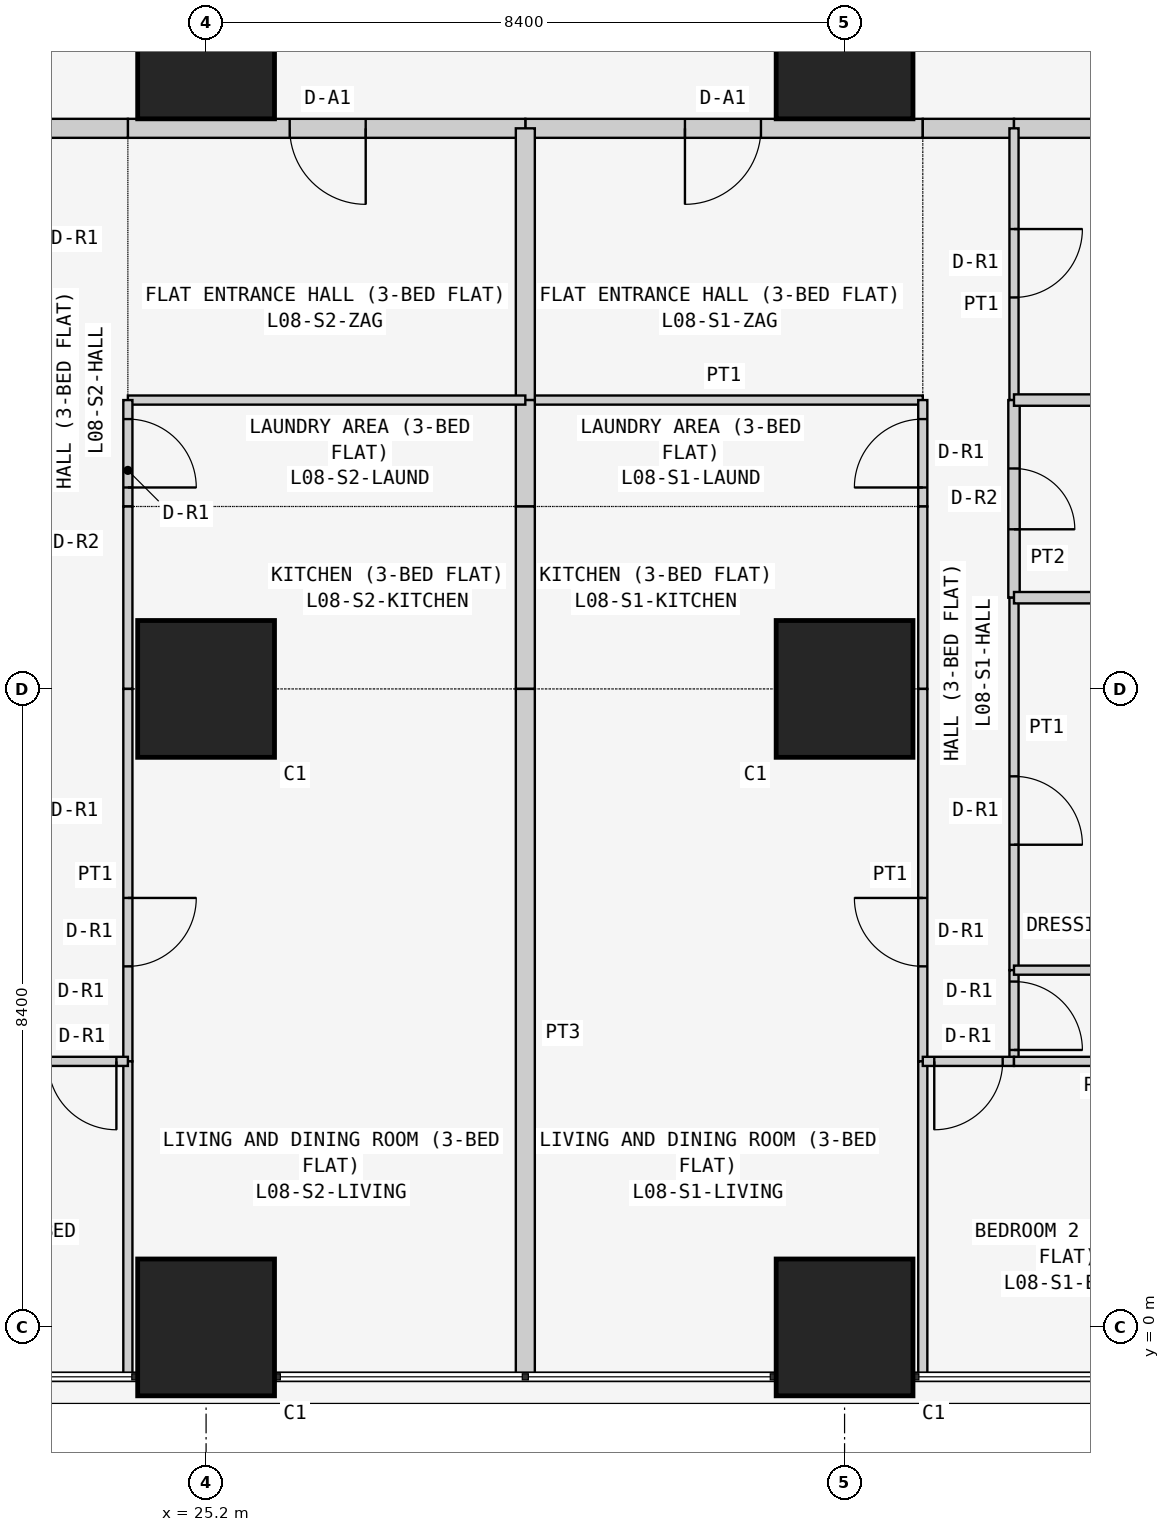
"""IFC4 building model, lengths in metres.
Left out: names, types, materials, properties, quantities, classifications, styles, units other than length and angle.
Written with IfcOpenShell. Run it as: python <this file> out.ifc"""

import sys

from ifc_helpers import new_model, si_unit, direction, frame, frame_2d, origin, origin_2d, place, context, subcontext, project, spatial, rectangle, extrude, element, fill, save


model = new_model("IFC4")
c1 = context("Model", 3, precision=1e-05, world=origin(), true_north=direction((0.0, 1.0)))
c2 = subcontext(c1, "Body", "Model", "MODEL_VIEW")
j1 = project(units=[si_unit("LENGTHUNIT", "METRE"), si_unit("PLANEANGLEUNIT", "RADIAN")], contexts=[c1])
p1 = place(None, origin())
s1 = spatial("IfcSite", under=j1, at=p1, CompositionType="ELEMENT")
p2 = place(p1, origin())
s2 = spatial("IfcBuilding", under=s1, at=p2, CompositionType="ELEMENT")
p3 = place(p2, frame((0.0, 0.0, 38.1)))
s3 = spatial("IfcBuildingStorey", under=s2, at=p3, CompositionType="ELEMENT", Elevation=38.1)
for number, where, z_axis, x_axis in (
    (1, (25.2, 0.0, 0.0), (0.0, 0.0, 1.0), (1.0, 0.0, 0.0)),
    (2, (25.2, 8.4, 0.0), (0.0, 0.0, 1.0), (1.0, 0.0, 0.0)),
    (3, (25.2, 16.8, 0.0), (0.0, 0.0, 1.0), (1.0, 0.0, 0.0)),
    (4, (33.6, 0.0, 0.0), (0.0, 0.0, 1.0), (1.0, 0.0, 0.0)),
    (5, (33.6, 8.4, 0.0), (0.0, 0.0, 1.0), (1.0, 0.0, 0.0)),
    (6, (33.6, 16.8, 0.0), (0.0, 0.0, 1.0), (1.0, 0.0, 0.0)),
):
    element("IfcColumn", number, at=place(p3, frame(where, z_axis=z_axis, x_axis=x_axis)), inside=s3, PredefinedType="COLUMN", context=c2, shape_type="SweptSolid", body=[
        extrude(rectangle(XDim=1.8, YDim=1.8, at=origin_2d()), origin(), (0.0, 0.0, 1.0), 3.6),
    ])
p4 = place(p3, frame((34.629, 15.775, 0.0), z_axis=(0.0, 0.0, 1.0), x_axis=(-1.0, 0.0, 0.0)))
e7 = element("IfcWall", 7, at=p4, inside=s3, PredefinedType="PARTITIONING", context=c2, shape_type="SweptSolid", body=[
    extrude(rectangle(XDim=5.229, YDim=0.25, at=frame_2d((2.615, 0.0))), origin(), (0.0, 0.0, 1.0), 3.45),
])
p5 = place(p4, frame((2.129, 0.0, 0.0)))
e8 = element("IfcOpeningElement", 8, at=p5, cuts=e7, PredefinedType="OPENING", context=c2, shape_type="SweptSolid", body=[
    extrude(rectangle(XDim=1.0, YDim=2.1, at=frame_2d((0.5, 1.05))), frame((0.0, 0.135, 0.0), z_axis=(0.0, -1.0, 0.0), x_axis=(1.0, 0.0, 0.0)), (0.0, 0.0, 1.0), 0.27),
])
p6 = place(p3, frame((35.829, 15.775, 0.0), z_axis=(0.0, 0.0, 1.0), x_axis=(-1.0, 0.0, 0.0)))
e9 = element("IfcWall", 9, at=p6, inside=s3, PredefinedType="PARTITIONING", context=c2, shape_type="SweptSolid", body=[
    extrude(rectangle(XDim=1.2, YDim=0.25, at=frame_2d((0.6, 0.0))), origin(), (0.0, 0.0, 1.0), 3.45),
])
p7 = place(p3, frame((42.7, 15.775, 0.0), z_axis=(0.0, 0.0, 1.0), x_axis=(-1.0, 0.0, 0.0)))
e10 = element("IfcWall", 10, at=p7, inside=s3, PredefinedType="PARTITIONING", context=c2, shape_type="SweptSolid", body=[
    extrude(rectangle(XDim=6.871, YDim=0.25, at=frame_2d((3.436, 0.0))), origin(), (0.0, 0.0, 1.0), 3.45),
])
p8 = place(p3, frame((29.4, 15.775, 0.0), z_axis=(0.0, 0.0, 1.0), x_axis=(-1.0, 0.0, 0.0)))
e11 = element("IfcWall", 11, at=p8, inside=s3, PredefinedType="PARTITIONING", context=c2, shape_type="SweptSolid", body=[
    extrude(rectangle(XDim=5.229, YDim=0.25, at=frame_2d((2.615, 0.0))), origin(), (0.0, 0.0, 1.0), 3.45),
])
p9 = place(p8, frame((2.1, 0.0, 0.0)))
e12 = element("IfcOpeningElement", 12, at=p9, cuts=e11, PredefinedType="OPENING", context=c2, shape_type="SweptSolid", body=[
    extrude(rectangle(XDim=1.0, YDim=2.1, at=frame_2d((0.5, 1.05))), frame((0.0, 0.135, 0.0), z_axis=(0.0, -1.0, 0.0), x_axis=(1.0, 0.0, 0.0)), (0.0, 0.0, 1.0), 0.27),
])
p10 = place(p3, frame((24.171, 15.775, 0.0), z_axis=(0.0, 0.0, 1.0), x_axis=(-1.0, 0.0, 0.0)))
e13 = element("IfcWall", 13, at=p10, inside=s3, PredefinedType="PARTITIONING", context=c2, shape_type="SweptSolid", body=[
    extrude(rectangle(XDim=1.2, YDim=0.25, at=frame_2d((0.6, 0.0))), origin(), (0.0, 0.0, 1.0), 3.45),
])
p11 = place(p3, frame((29.4, 12.2, 0.0), z_axis=(0.0, 0.0, 1.0), x_axis=(1.0, 0.0, 0.0)))
e14 = element("IfcWall", 14, at=p11, inside=s3, PredefinedType="PARTITIONING", context=c2, shape_type="SweptSolid", body=[
    extrude(rectangle(XDim=5.229, YDim=0.12, at=frame_2d((2.615, 0.0))), origin(), (0.0, 0.0, 1.0), 3.45),
])
p12 = place(p3, frame((29.4, 15.775, 0.0), z_axis=(0.0, 0.0, 1.0), x_axis=(0.0, -1.0, 0.0)))
e15 = element("IfcWall", 15, at=p12, inside=s3, PredefinedType="PARTITIONING", context=c2, shape_type="SweptSolid", body=[
    extrude(rectangle(XDim=3.575, YDim=0.25, at=frame_2d((1.788, 0.0))), origin(), (0.0, 0.0, 1.0), 2.848),
])
p13 = place(p3, frame((34.629, 10.8, 0.0), z_axis=(0.0, 0.0, 1.0), x_axis=(0.0, 1.0, 0.0)))
e16 = element("IfcWall", 16, at=p13, inside=s3, PredefinedType="PARTITIONING", context=c2, shape_type="SweptSolid", body=[
    extrude(rectangle(XDim=1.4, YDim=0.12, at=frame_2d((0.7, 0.0))), origin(), (0.0, 0.0, 1.0), 3.45),
])
p14 = place(p13, frame((0.25, 0.0, 0.0)))
e17 = element("IfcOpeningElement", 17, at=p14, cuts=e16, PredefinedType="OPENING", context=c2, shape_type="SweptSolid", body=[
    extrude(rectangle(XDim=0.9, YDim=2.1, at=frame_2d((0.45, 1.05))), frame((0.0, 0.07, 0.0), z_axis=(0.0, -1.0, 0.0), x_axis=(1.0, 0.0, 0.0)), (0.0, 0.0, 1.0), 0.14),
])
p15 = place(p3, frame((29.4, 12.2, 0.0), z_axis=(0.0, 0.0, 1.0), x_axis=(0.0, -1.0, 0.0)))
e18 = element("IfcWall", 18, at=p15, inside=s3, PredefinedType="PARTITIONING", context=c2, shape_type="SweptSolid", body=[
    extrude(rectangle(XDim=1.4, YDim=0.25, at=frame_2d((0.7, 0.0))), origin(), (0.0, 0.0, 1.0), 2.848),
])
p16 = place(p3, frame((34.629, 8.4, 0.0), z_axis=(0.0, 0.0, 1.0), x_axis=(0.0, 1.0, 0.0)))
e19 = element("IfcWall", 19, at=p16, inside=s3, PredefinedType="PARTITIONING", context=c2, shape_type="SweptSolid", body=[
    extrude(rectangle(XDim=2.4, YDim=0.12, at=frame_2d((1.2, 0.0))), origin(), (0.0, 0.0, 1.0), 3.45),
])
p17 = place(p3, frame((29.4, 10.8, 0.0), z_axis=(0.0, 0.0, 1.0), x_axis=(0.0, -1.0, 0.0)))
e20 = element("IfcWall", 20, at=p17, inside=s3, PredefinedType="PARTITIONING", context=c2, shape_type="SweptSolid", body=[
    extrude(rectangle(XDim=2.4, YDim=0.25, at=frame_2d((1.2, 0.0))), origin(), (0.0, 0.0, 1.0), 2.848),
])
p18 = place(p3, frame((34.629, 3.5, 0.0), z_axis=(0.0, 0.0, 1.0), x_axis=(0.0, 1.0, 0.0)))
e21 = element("IfcWall", 21, at=p18, inside=s3, PredefinedType="PARTITIONING", context=c2, shape_type="SweptSolid", body=[
    extrude(rectangle(XDim=4.9, YDim=0.12, at=frame_2d((2.45, 0.0))), origin(), (0.0, 0.0, 1.0), 3.45),
])
p19 = place(p18, frame((1.25, 0.0, 0.0)))
e22 = element("IfcOpeningElement", 22, at=p19, cuts=e21, PredefinedType="OPENING", context=c2, shape_type="SweptSolid", body=[
    extrude(rectangle(XDim=0.9, YDim=2.1, at=frame_2d((0.45, 1.05))), frame((0.0, 0.07, 0.0), z_axis=(0.0, -1.0, 0.0), x_axis=(1.0, 0.0, 0.0)), (0.0, 0.0, 1.0), 0.14),
])
p20 = place(p3, frame((34.629, -0.65, 0.0), z_axis=(0.0, 0.0, 1.0), x_axis=(0.0, 1.0, 0.0)))
e23 = element("IfcWall", 23, at=p20, inside=s3, PredefinedType="PARTITIONING", context=c2, shape_type="SweptSolid", body=[
    extrude(rectangle(XDim=4.15, YDim=0.12, at=frame_2d((2.075, 0.0))), origin(), (0.0, 0.0, 1.0), 3.45),
])
p21 = place(p3, frame((29.4, 8.4, 0.0), z_axis=(0.0, 0.0, 1.0), x_axis=(0.0, -1.0, 0.0)))
e24 = element("IfcWall", 24, at=p21, inside=s3, PredefinedType="PARTITIONING", context=c2, shape_type="SweptSolid", body=[
    extrude(rectangle(XDim=9.05, YDim=0.25, at=frame_2d((4.525, 0.0))), origin(), (0.0, 0.0, 1.0), 2.848),
])
p22 = place(p3, frame((35.829, 12.2, 0.0), z_axis=(0.0, 0.0, 1.0), x_axis=(0.0, 1.0, 0.0)))
e25 = element("IfcWall", 25, at=p22, inside=s3, PredefinedType="PARTITIONING", context=c2, shape_type="SweptSolid", body=[
    extrude(rectangle(XDim=3.575, YDim=0.12, at=frame_2d((1.788, 0.0))), origin(), (0.0, 0.0, 1.0), 3.45),
])
p23 = place(p22, frame((1.35, 0.0, 0.0)))
e26 = element("IfcOpeningElement", 26, at=p23, cuts=e25, PredefinedType="OPENING", context=c2, shape_type="SweptSolid", body=[
    extrude(rectangle(XDim=0.9, YDim=2.1, at=frame_2d((0.45, 1.05))), frame((0.0, 0.07, 0.0), z_axis=(0.0, -1.0, 0.0), x_axis=(1.0, 0.0, 0.0)), (0.0, 0.0, 1.0), 0.14),
])
p24 = place(p3, frame((35.829, 9.6, 0.0), z_axis=(0.0, 0.0, 1.0), x_axis=(0.0, 1.0, 0.0)))
e27 = element("IfcWall", 27, at=p24, inside=s3, PredefinedType="PARTITIONING", context=c2, shape_type="SweptSolid", body=[
    extrude(rectangle(XDim=2.6, YDim=0.15, at=frame_2d((1.3, 0.0))), origin(), (0.0, 0.0, 1.0), 3.45),
])
p25 = place(p24, frame((0.9, 0.0, 0.0)))
e28 = element("IfcOpeningElement", 28, at=p25, cuts=e27, PredefinedType="OPENING", context=c2, shape_type="SweptSolid", body=[
    extrude(rectangle(XDim=0.8, YDim=2.1, at=frame_2d((0.4, 1.05))), frame((0.0, 0.085, 0.0), z_axis=(0.0, -1.0, 0.0), x_axis=(1.0, 0.0, 0.0)), (0.0, 0.0, 1.0), 0.17),
])
p26 = place(p3, frame((35.829, 4.7, 0.0), z_axis=(0.0, 0.0, 1.0), x_axis=(0.0, 1.0, 0.0)))
e29 = element("IfcWall", 29, at=p26, inside=s3, PredefinedType="PARTITIONING", context=c2, shape_type="SweptSolid", body=[
    extrude(rectangle(XDim=4.9, YDim=0.12, at=frame_2d((2.45, 0.0))), origin(), (0.0, 0.0, 1.0), 3.45),
])
p27 = place(p26, frame((1.65, 0.0, 0.0)))
e30 = element("IfcOpeningElement", 30, at=p27, cuts=e29, PredefinedType="OPENING", context=c2, shape_type="SweptSolid", body=[
    extrude(rectangle(XDim=0.9, YDim=2.1, at=frame_2d((0.45, 1.05))), frame((0.0, 0.07, 0.0), z_axis=(0.0, -1.0, 0.0), x_axis=(1.0, 0.0, 0.0)), (0.0, 0.0, 1.0), 0.14),
])
p28 = place(p3, frame((35.829, 3.5, 0.0), z_axis=(0.0, 0.0, 1.0), x_axis=(0.0, 1.0, 0.0)))
e31 = element("IfcWall", 31, at=p28, inside=s3, PredefinedType="PARTITIONING", context=c2, shape_type="SweptSolid", body=[
    extrude(rectangle(XDim=1.2, YDim=0.12, at=frame_2d((0.6, 0.0))), origin(), (0.0, 0.0, 1.0), 3.45),
])
p29 = place(p28, frame((0.15, 0.0, 0.0)))
e32 = element("IfcOpeningElement", 32, at=p29, cuts=e31, PredefinedType="OPENING", context=c2, shape_type="SweptSolid", body=[
    extrude(rectangle(XDim=0.9, YDim=2.1, at=frame_2d((0.45, 1.05))), frame((0.0, 0.07, 0.0), z_axis=(0.0, -1.0, 0.0), x_axis=(1.0, 0.0, 0.0)), (0.0, 0.0, 1.0), 0.14),
])
p30 = place(p3, frame((34.629, 3.5, 0.0), z_axis=(0.0, 0.0, 1.0), x_axis=(1.0, 0.0, 0.0)))
e33 = element("IfcWall", 33, at=p30, inside=s3, PredefinedType="PARTITIONING", context=c2, shape_type="SweptSolid", body=[
    extrude(rectangle(XDim=1.2, YDim=0.12, at=frame_2d((0.6, 0.0))), origin(), (0.0, 0.0, 1.0), 3.45),
])
p31 = place(p30, frame((0.151, 0.0, 0.0)))
e34 = element("IfcOpeningElement", 34, at=p31, cuts=e33, PredefinedType="OPENING", context=c2, shape_type="SweptSolid", body=[
    extrude(rectangle(XDim=0.9, YDim=2.1, at=frame_2d((0.45, 1.05))), frame((0.0, 0.07, 0.0), z_axis=(0.0, -1.0, 0.0), x_axis=(1.0, 0.0, 0.0)), (0.0, 0.0, 1.0), 0.14),
])
for number, where, z_axis, x_axis in (
    (35, (35.829, 12.2, 0.0), (0.0, 0.0, 1.0), (1.0, 0.0, 0.0)),
    (36, (35.829, 9.6, 0.0), (0.0, 0.0, 1.0), (1.0, 0.0, 0.0)),
):
    element("IfcWall", number, at=place(p3, frame(where, z_axis=z_axis, x_axis=x_axis)), inside=s3, PredefinedType="PARTITIONING", context=c2, shape_type="SweptSolid", body=[
        extrude(rectangle(XDim=2.971, YDim=0.15, at=frame_2d((1.485, 0.0))), origin(), (0.0, 0.0, 1.0), 3.45),
    ])
for number, where, z_axis, x_axis in (
    (37, (35.829, 4.7, 0.0), (0.0, 0.0, 1.0), (1.0, 0.0, 0.0)),
    (38, (35.829, 3.5, 0.0), (0.0, 0.0, 1.0), (1.0, 0.0, 0.0)),
):
    element("IfcWall", number, at=place(p3, frame(where, z_axis=z_axis, x_axis=x_axis)), inside=s3, PredefinedType="PARTITIONING", context=c2, shape_type="SweptSolid", body=[
        extrude(rectangle(XDim=2.285, YDim=0.12, at=frame_2d((1.143, 0.0))), origin(), (0.0, 0.0, 1.0), 3.45),
    ])
p32 = place(p3, frame((29.4, 12.2, 0.0), z_axis=(0.0, 0.0, 1.0), x_axis=(-1.0, 0.0, 0.0)))
e39 = element("IfcWall", 39, at=p32, inside=s3, PredefinedType="PARTITIONING", context=c2, shape_type="SweptSolid", body=[
    extrude(rectangle(XDim=5.229, YDim=0.12, at=frame_2d((2.615, 0.0))), origin(), (0.0, 0.0, 1.0), 3.45),
])
p33 = place(p3, frame((24.171, 10.8, 0.0), z_axis=(0.0, 0.0, 1.0), x_axis=(0.0, 1.0, 0.0)))
e40 = element("IfcWall", 40, at=p33, inside=s3, PredefinedType="PARTITIONING", context=c2, shape_type="SweptSolid", body=[
    extrude(rectangle(XDim=1.4, YDim=0.12, at=frame_2d((0.7, 0.0))), origin(), (0.0, 0.0, 1.0), 3.45),
])
p34 = place(p33, frame((0.25, 0.0, 0.0)))
e41 = element("IfcOpeningElement", 41, at=p34, cuts=e40, PredefinedType="OPENING", context=c2, shape_type="SweptSolid", body=[
    extrude(rectangle(XDim=0.9, YDim=2.1, at=frame_2d((0.45, 1.05))), frame((0.0, 0.07, 0.0), z_axis=(0.0, -1.0, 0.0), x_axis=(1.0, 0.0, 0.0)), (0.0, 0.0, 1.0), 0.14),
])
p35 = place(p3, frame((24.171, 8.4, 0.0), z_axis=(0.0, 0.0, 1.0), x_axis=(0.0, 1.0, 0.0)))
e42 = element("IfcWall", 42, at=p35, inside=s3, PredefinedType="PARTITIONING", context=c2, shape_type="SweptSolid", body=[
    extrude(rectangle(XDim=2.4, YDim=0.12, at=frame_2d((1.2, 0.0))), origin(), (0.0, 0.0, 1.0), 3.45),
])
p36 = place(p3, frame((24.171, 3.5, 0.0), z_axis=(0.0, 0.0, 1.0), x_axis=(0.0, 1.0, 0.0)))
e43 = element("IfcWall", 43, at=p36, inside=s3, PredefinedType="PARTITIONING", context=c2, shape_type="SweptSolid", body=[
    extrude(rectangle(XDim=4.9, YDim=0.12, at=frame_2d((2.45, 0.0))), origin(), (0.0, 0.0, 1.0), 3.45),
])
p37 = place(p36, frame((1.25, 0.0, 0.0)))
e44 = element("IfcOpeningElement", 44, at=p37, cuts=e43, PredefinedType="OPENING", context=c2, shape_type="SweptSolid", body=[
    extrude(rectangle(XDim=0.9, YDim=2.1, at=frame_2d((0.45, 1.05))), frame((0.0, 0.07, 0.0), z_axis=(0.0, -1.0, 0.0), x_axis=(1.0, 0.0, 0.0)), (0.0, 0.0, 1.0), 0.14),
])
p38 = place(p3, frame((24.171, -0.65, 0.0), z_axis=(0.0, 0.0, 1.0), x_axis=(0.0, 1.0, 0.0)))
e45 = element("IfcWall", 45, at=p38, inside=s3, PredefinedType="PARTITIONING", context=c2, shape_type="SweptSolid", body=[
    extrude(rectangle(XDim=4.15, YDim=0.12, at=frame_2d((2.075, 0.0))), origin(), (0.0, 0.0, 1.0), 3.45),
])
p39 = place(p3, frame((24.171, 3.5, 0.0), z_axis=(0.0, 0.0, 1.0), x_axis=(-1.0, 0.0, 0.0)))
e46 = element("IfcWall", 46, at=p39, inside=s3, PredefinedType="PARTITIONING", context=c2, shape_type="SweptSolid", body=[
    extrude(rectangle(XDim=1.2, YDim=0.12, at=frame_2d((0.6, 0.0))), origin(), (0.0, 0.0, 1.0), 3.45),
])
p40 = place(p39, frame((0.151, 0.0, 0.0)))
e47 = element("IfcOpeningElement", 47, at=p40, cuts=e46, PredefinedType="OPENING", context=c2, shape_type="SweptSolid", body=[
    extrude(rectangle(XDim=0.9, YDim=2.1, at=frame_2d((0.45, 1.05))), frame((0.0, 0.07, 0.0), z_axis=(0.0, -1.0, 0.0), x_axis=(1.0, 0.0, 0.0)), (0.0, 0.0, 1.0), 0.14),
])
p41 = place(p5, origin())
e48 = element("IfcDoor", 48, at=p41, inside=s3, OperationType="SINGLE_SWING_RIGHT", PredefinedType="DOOR", context=c2, shape_type="SweptSolid", body=[
    extrude(rectangle(XDim=1.0, YDim=2.1, at=frame_2d((0.5, 1.05))), frame((0.0, 0.025, 0.0), z_axis=(0.0, -1.0, 0.0), x_axis=(1.0, 0.0, 0.0)), (0.0, 0.0, 1.0), 0.05),
])
fill(e8, e48)
p42 = place(p14, origin())
e49 = element("IfcDoor", 49, at=p42, inside=s3, OperationType="SINGLE_SWING_LEFT", PredefinedType="DOOR", context=c2, shape_type="SweptSolid", body=[
    extrude(rectangle(XDim=0.9, YDim=2.1, at=frame_2d((0.45, 1.05))), frame((0.0, 0.025, 0.0), z_axis=(0.0, -1.0, 0.0), x_axis=(1.0, 0.0, 0.0)), (0.0, 0.0, 1.0), 0.05),
])
fill(e17, e49)
p43 = place(p19, origin())
e50 = element("IfcDoor", 50, at=p43, inside=s3, OperationType="SINGLE_SWING_RIGHT", PredefinedType="DOOR", context=c2, shape_type="SweptSolid", body=[
    extrude(rectangle(XDim=0.9, YDim=2.1, at=frame_2d((0.45, 1.05))), frame((0.0, 0.025, 0.0), z_axis=(0.0, -1.0, 0.0), x_axis=(1.0, 0.0, 0.0)), (0.0, 0.0, 1.0), 0.05),
])
fill(e22, e50)
p44 = place(p23, frame((0.9, 0.0, 0.0), z_axis=(0.0, 0.0, 1.0), x_axis=(-1.0, 0.0, 0.0)))
e51 = element("IfcDoor", 51, at=p44, inside=s3, OperationType="SINGLE_SWING_LEFT", PredefinedType="DOOR", context=c2, shape_type="SweptSolid", body=[
    extrude(rectangle(XDim=0.9, YDim=2.1, at=frame_2d((0.45, 1.05))), frame((0.0, 0.025, 0.0), z_axis=(0.0, -1.0, 0.0), x_axis=(1.0, 0.0, 0.0)), (0.0, 0.0, 1.0), 0.05),
])
fill(e26, e51)
p45 = place(p25, frame((0.8, 0.0, 0.0), z_axis=(0.0, 0.0, 1.0), x_axis=(-1.0, 0.0, 0.0)))
e52 = element("IfcDoor", 52, at=p45, inside=s3, OperationType="SINGLE_SWING_RIGHT", PredefinedType="DOOR", context=c2, shape_type="SweptSolid", body=[
    extrude(rectangle(XDim=0.8, YDim=2.1, at=frame_2d((0.4, 1.05))), frame((0.0, 0.025, 0.0), z_axis=(0.0, -1.0, 0.0), x_axis=(1.0, 0.0, 0.0)), (0.0, 0.0, 1.0), 0.05),
])
fill(e28, e52)
p46 = place(p27, frame((0.9, 0.0, 0.0), z_axis=(0.0, 0.0, 1.0), x_axis=(-1.0, 0.0, 0.0)))
e53 = element("IfcDoor", 53, at=p46, inside=s3, OperationType="SINGLE_SWING_RIGHT", PredefinedType="DOOR", context=c2, shape_type="SweptSolid", body=[
    extrude(rectangle(XDim=0.9, YDim=2.1, at=frame_2d((0.45, 1.05))), frame((0.0, 0.025, 0.0), z_axis=(0.0, -1.0, 0.0), x_axis=(1.0, 0.0, 0.0)), (0.0, 0.0, 1.0), 0.05),
])
fill(e30, e53)
p47 = place(p29, frame((0.9, 0.0, 0.0), z_axis=(0.0, 0.0, 1.0), x_axis=(-1.0, 0.0, 0.0)))
e54 = element("IfcDoor", 54, at=p47, inside=s3, OperationType="SINGLE_SWING_RIGHT", PredefinedType="DOOR", context=c2, shape_type="SweptSolid", body=[
    extrude(rectangle(XDim=0.9, YDim=2.1, at=frame_2d((0.45, 1.05))), frame((0.0, 0.025, 0.0), z_axis=(0.0, -1.0, 0.0), x_axis=(1.0, 0.0, 0.0)), (0.0, 0.0, 1.0), 0.05),
])
fill(e32, e54)
p48 = place(p31, frame((0.9, 0.0, 0.0), z_axis=(0.0, 0.0, 1.0), x_axis=(-1.0, 0.0, 0.0)))
e55 = element("IfcDoor", 55, at=p48, inside=s3, OperationType="SINGLE_SWING_RIGHT", PredefinedType="DOOR", context=c2, shape_type="SweptSolid", body=[
    extrude(rectangle(XDim=0.9, YDim=2.1, at=frame_2d((0.45, 1.05))), frame((0.0, 0.025, 0.0), z_axis=(0.0, -1.0, 0.0), x_axis=(1.0, 0.0, 0.0)), (0.0, 0.0, 1.0), 0.05),
])
fill(e34, e55)
p49 = place(p9, origin())
e56 = element("IfcDoor", 56, at=p49, inside=s3, OperationType="SINGLE_SWING_LEFT", PredefinedType="DOOR", context=c2, shape_type="SweptSolid", body=[
    extrude(rectangle(XDim=1.0, YDim=2.1, at=frame_2d((0.5, 1.05))), frame((0.0, 0.025, 0.0), z_axis=(0.0, -1.0, 0.0), x_axis=(1.0, 0.0, 0.0)), (0.0, 0.0, 1.0), 0.05),
])
fill(e12, e56)
p50 = place(p34, frame((0.9, 0.0, 0.0), z_axis=(0.0, 0.0, 1.0), x_axis=(-1.0, 0.0, 0.0)))
e57 = element("IfcDoor", 57, at=p50, inside=s3, OperationType="SINGLE_SWING_RIGHT", PredefinedType="DOOR", context=c2, shape_type="SweptSolid", body=[
    extrude(rectangle(XDim=0.9, YDim=2.1, at=frame_2d((0.45, 1.05))), frame((0.0, 0.025, 0.0), z_axis=(0.0, -1.0, 0.0), x_axis=(1.0, 0.0, 0.0)), (0.0, 0.0, 1.0), 0.05),
])
fill(e41, e57)
p51 = place(p37, frame((0.9, 0.0, 0.0), z_axis=(0.0, 0.0, 1.0), x_axis=(-1.0, 0.0, 0.0)))
e58 = element("IfcDoor", 58, at=p51, inside=s3, OperationType="SINGLE_SWING_LEFT", PredefinedType="DOOR", context=c2, shape_type="SweptSolid", body=[
    extrude(rectangle(XDim=0.9, YDim=2.1, at=frame_2d((0.45, 1.05))), frame((0.0, 0.025, 0.0), z_axis=(0.0, -1.0, 0.0), x_axis=(1.0, 0.0, 0.0)), (0.0, 0.0, 1.0), 0.05),
])
fill(e44, e58)
p52 = place(p40, origin())
e59 = element("IfcDoor", 59, at=p52, inside=s3, OperationType="SINGLE_SWING_LEFT", PredefinedType="DOOR", context=c2, shape_type="SweptSolid", body=[
    extrude(rectangle(XDim=0.9, YDim=2.1, at=frame_2d((0.45, 1.05))), frame((0.0, 0.025, 0.0), z_axis=(0.0, -1.0, 0.0), x_axis=(1.0, 0.0, 0.0)), (0.0, 0.0, 1.0), 0.05),
])
fill(e47, e59)
save(model, sys.argv[1])
